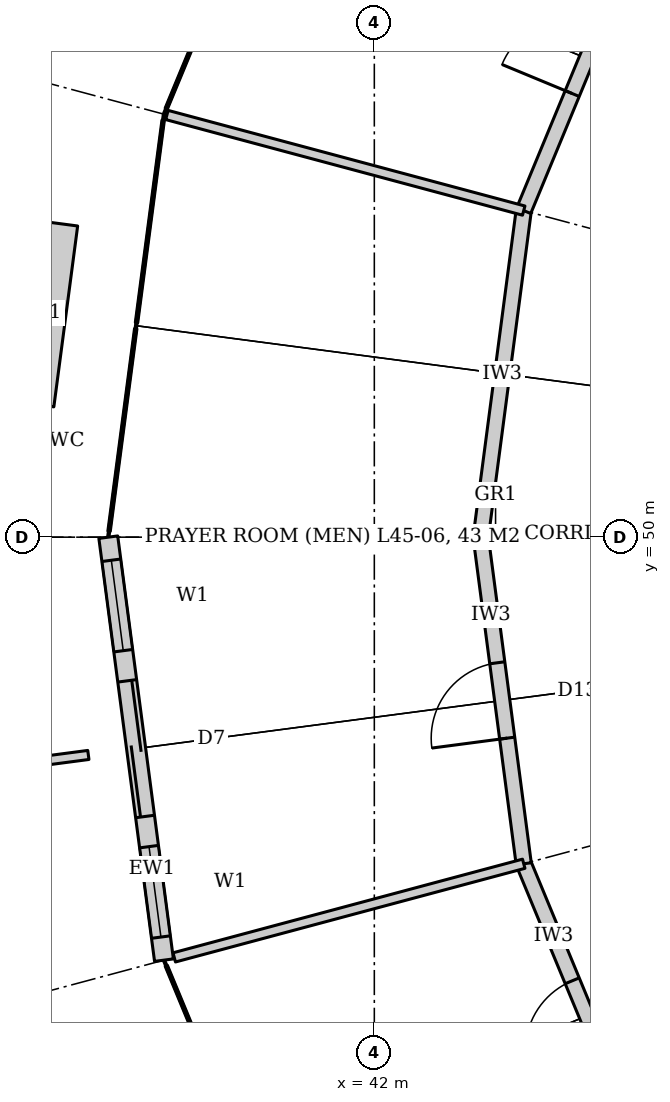
"""IFC4 building model, lengths in metres.
Left out: names, types, materials, properties, quantities, classifications, styles, units other than length and angle.
Written with IfcOpenShell. Run it as: python <this file> out.ifc"""

import sys

from ifc_helpers import new_model, si_unit, direction, frame, frame_2d, origin, place, context, subcontext, project, spatial, rectangle, extrude, element, fill, save


model = new_model("IFC4")
c1 = context("Model", 3, precision=1e-05, world=origin(), true_north=direction((0.0, 1.0)))
c2 = subcontext(c1, "Body", "Model", "MODEL_VIEW")
j1 = project(units=[si_unit("LENGTHUNIT", "METRE"), si_unit("PLANEANGLEUNIT", "RADIAN")], contexts=[c1])
p1 = place(None, origin())
s1 = spatial("IfcSite", under=j1, at=p1, CompositionType="ELEMENT")
p2 = place(p1, origin())
s2 = spatial("IfcBuilding", under=s1, at=p2, CompositionType="ELEMENT")
p3 = place(p2, frame((0.0, 0.0, 198.2)))
s3 = spatial("IfcBuildingStorey", under=s2, at=p3, CompositionType="ELEMENT", Elevation=198.2)
p4 = place(p3, frame((45.624, 41.7, 0.0), z_axis=(0.0, 0.0, 1.0), x_axis=(-0.382698425325, 0.923873322082, 0.0)))
e1 = element("IfcWall", 1, at=p4, inside=s3, PredefinedType="PARTITIONING", context=c2, shape_type="SweptSolid", body=[
    extrude(rectangle(XDim=4.333, YDim=0.2, at=frame_2d((2.167, 0.0))), origin(), (0.0, 0.0, 1.0), 3.012),
])
p5 = place(p4, frame((1.667, 0.0, 0.0)))
e2 = element("IfcOpeningElement", 2, at=p5, cuts=e1, PredefinedType="OPENING", context=c2, shape_type="SweptSolid", body=[
    extrude(rectangle(XDim=1.0, YDim=2.1, at=frame_2d((0.5, 1.05))), frame((0.0, 0.11, 0.0), z_axis=(0.0, -1.0, 0.0), x_axis=(1.0, 0.0, 0.0)), (0.0, 0.0, 1.0), 0.22),
])
p6 = place(p3, frame((43.966, 45.704, 0.0), z_axis=(0.0, 0.0, 1.0), x_axis=(-0.130536124221, 0.99144355375, 0.0)))
e3 = element("IfcWall", 3, at=p6, inside=s3, PredefinedType="PARTITIONING", context=c2, shape_type="SweptSolid", body=[
    extrude(rectangle(XDim=4.333, YDim=0.2, at=frame_2d((2.167, 0.0))), origin(), (0.0, 0.0, 1.0), 3.012),
])
p7 = place(p6, frame((1.667, 0.0, 0.0)))
e4 = element("IfcOpeningElement", 4, at=p7, cuts=e3, PredefinedType="OPENING", context=c2, shape_type="SweptSolid", body=[
    extrude(rectangle(XDim=1.0, YDim=2.4, at=frame_2d((0.5, 1.2))), frame((0.0, 0.11, 0.0), z_axis=(0.0, -1.0, 0.0), x_axis=(1.0, 0.0, 0.0)), (0.0, 0.0, 1.0), 0.22),
])
p8 = place(p3, frame((43.4, 50.0, 0.0), z_axis=(0.0, 0.0, 1.0), x_axis=(0.130536124221, 0.99144355375, 0.0)))
e5 = element("IfcWall", 5, at=p8, inside=s3, PredefinedType="PARTITIONING", context=c2, shape_type="SweptSolid", body=[
    extrude(rectangle(XDim=4.333, YDim=0.2, at=frame_2d((2.167, 0.0))), origin(), (0.0, 0.0, 1.0), 3.012),
])
p9 = place(p3, frame((43.966, 54.296, 0.0), z_axis=(0.0, 0.0, 1.0), x_axis=(0.382698425325, 0.923873322082, 0.0)))
e6 = element("IfcWall", 6, at=p9, inside=s3, PredefinedType="PARTITIONING", context=c2, shape_type="SweptSolid", body=[
    extrude(rectangle(XDim=4.333, YDim=0.2, at=frame_2d((2.167, 0.0))), origin(), (0.0, 0.0, 1.0), 3.012),
])
p10 = place(p9, frame((1.667, 0.0, 0.0)))
e7 = element("IfcOpeningElement", 7, at=p10, cuts=e6, PredefinedType="OPENING", context=c2, shape_type="SweptSolid", body=[
    extrude(rectangle(XDim=1.0, YDim=2.1, at=frame_2d((0.5, 1.05))), frame((0.0, 0.11, 0.0), z_axis=(0.0, -1.0, 0.0), x_axis=(1.0, 0.0, 0.0)), (0.0, 0.0, 1.0), 0.22),
])
p11 = place(p3, frame((53.8, 56.2, 0.0), z_axis=(0.0, 0.0, 1.0), x_axis=(-0.707106781187, 0.707106781187, 0.0)))
e8 = element("IfcWall", 8, at=p11, inside=s3, PredefinedType="PARTITIONING", context=c2, shape_type="SweptSolid", body=[
    extrude(rectangle(XDim=12.692, YDim=0.2, at=frame_2d((6.346, 0.0))), origin(), (0.0, 0.0, 1.0), 3.02),
])
p12 = place(p3, frame((43.966, 54.296, 0.0), z_axis=(0.0, 0.0, 1.0), x_axis=(-0.965927422152, 0.258813089189, 0.0)))
e9 = element("IfcWall", 9, at=p12, inside=s3, PredefinedType="PARTITIONING", context=c2, shape_type="SweptSolid", body=[
    extrude(rectangle(XDim=4.86, YDim=0.125, at=frame_2d((2.43, 0.0))), origin(), (0.0, 0.0, 1.0), 3.04),
])
p13 = place(p3, frame((43.966, 45.704, 0.0), z_axis=(0.0, 0.0, 1.0), x_axis=(-0.965926072385, -0.25881812666, 0.0)))
e10 = element("IfcWall", 10, at=p13, inside=s3, PredefinedType="PARTITIONING", context=c2, shape_type="SweptSolid", body=[
    extrude(rectangle(XDim=4.76, YDim=0.125, at=frame_2d((2.38, 0.0))), origin(), (0.0, 0.0, 1.0), 3.04),
])
p14 = place(p3, frame((53.8, 43.8, 0.0), z_axis=(0.0, 0.0, 1.0), x_axis=(-0.707106781187, -0.707106781187, 0.0)))
e11 = element("IfcWall", 11, at=p14, inside=s3, PredefinedType="PARTITIONING", context=c2, shape_type="SweptSolid", body=[
    extrude(rectangle(XDim=12.692, YDim=0.2, at=frame_2d((6.346, 0.0))), origin(), (0.0, 0.0, 1.0), 3.02),
])
p15 = place(p14, frame((2.716, 0.0, 0.0)))
e12 = element("IfcOpeningElement", 12, at=p15, cuts=e11, PredefinedType="OPENING", context=c2, shape_type="SweptSolid", body=[
    extrude(rectangle(XDim=2.4, YDim=2.4, at=frame_2d((1.2, 1.2))), frame((0.0, 0.11, 0.0), z_axis=(0.0, -1.0, 0.0), x_axis=(1.0, 0.0, 0.0)), (0.0, 0.0, 1.0), 0.22),
])
p16 = place(p3, frame((38.5, 50.0, 0.0), z_axis=(0.0, 0.0, 1.0), x_axis=(0.130536651449, -0.991443484334, 0.0)))
e13 = element("IfcWall", 13, at=p16, inside=s3, PredefinedType="SOLIDWALL", context=c2, shape_type="SweptSolid", body=[
    extrude(rectangle(XDim=5.613, YDim=0.25, at=frame_2d((2.806, 0.0))), origin(), (0.0, 0.0, 1.0), 4.04),
])
p17 = place(p16, frame((1.906, 0.0, 0.0)))
e14 = element("IfcOpeningElement", 14, at=p17, cuts=e13, PredefinedType="OPENING", context=c2, shape_type="SweptSolid", body=[
    extrude(rectangle(XDim=1.8, YDim=2.4, at=frame_2d((0.9, 1.2))), frame((0.0, 0.135, 0.0), z_axis=(0.0, -1.0, 0.0), x_axis=(1.0, 0.0, 0.0)), (0.0, 0.0, 1.0), 0.27),
])
p18 = place(p16, frame((0.306, 0.0, 0.0)))
e15 = element("IfcOpeningElement", 15, at=p18, cuts=e13, PredefinedType="OPENING", context=c2, shape_type="SweptSolid", body=[
    extrude(rectangle(XDim=1.2, YDim=2.4, at=frame_2d((0.6, 1.2))), frame((0.0, 0.135, 0.0), z_axis=(0.0, -1.0, 0.0), x_axis=(1.0, 0.0, 0.0)), (0.0, 0.0, 1.0), 0.27),
])
p19 = place(p16, frame((4.106, 0.0, 0.0)))
e16 = element("IfcOpeningElement", 16, at=p19, cuts=e13, PredefinedType="OPENING", context=c2, shape_type="SweptSolid", body=[
    extrude(rectangle(XDim=1.2, YDim=2.4, at=frame_2d((0.6, 1.2))), frame((0.0, 0.135, 0.0), z_axis=(0.0, -1.0, 0.0), x_axis=(1.0, 0.0, 0.0)), (0.0, 0.0, 1.0), 0.27),
])
p20 = place(p10, origin())
e17 = element("IfcDoor", 17, at=p20, inside=s3, OperationType="SINGLE_SWING_LEFT", PredefinedType="DOOR", context=c2, shape_type="SweptSolid", body=[
    extrude(rectangle(XDim=1.0, YDim=2.1, at=frame_2d((0.5, 1.05))), frame((0.0, 0.025, 0.0), z_axis=(0.0, -1.0, 0.0), x_axis=(1.0, 0.0, 0.0)), (0.0, 0.0, 1.0), 0.05),
])
fill(e7, e17)
p21 = place(p7, origin())
e18 = element("IfcDoor", 18, at=p21, inside=s3, OperationType="SINGLE_SWING_LEFT", PredefinedType="DOOR", context=c2, shape_type="SweptSolid", body=[
    extrude(rectangle(XDim=1.0, YDim=2.4, at=frame_2d((0.5, 1.2))), frame((0.0, 0.025, 0.0), z_axis=(0.0, -1.0, 0.0), x_axis=(1.0, 0.0, 0.0)), (0.0, 0.0, 1.0), 0.05),
])
fill(e4, e18)
p22 = place(p5, origin())
e19 = element("IfcDoor", 19, at=p22, inside=s3, OperationType="SINGLE_SWING_LEFT", PredefinedType="DOOR", context=c2, shape_type="SweptSolid", body=[
    extrude(rectangle(XDim=1.0, YDim=2.1, at=frame_2d((0.5, 1.05))), frame((0.0, 0.025, 0.0), z_axis=(0.0, -1.0, 0.0), x_axis=(1.0, 0.0, 0.0)), (0.0, 0.0, 1.0), 0.05),
])
fill(e2, e19)
p23 = place(p17, origin())
e20 = element("IfcDoor", 20, at=p23, inside=s3, OperationType="DOUBLE_DOOR_SLIDING", PredefinedType="DOOR", context=c2, shape_type="SweptSolid", body=[
    extrude(rectangle(XDim=1.8, YDim=2.4, at=frame_2d((0.9, 1.2))), frame((0.0, 0.025, 0.0), z_axis=(0.0, -1.0, 0.0), x_axis=(1.0, 0.0, 0.0)), (0.0, 0.0, 1.0), 0.05),
])
fill(e14, e20)
p24 = place(p18, origin())
e21 = element("IfcWindow", 21, at=p24, inside=s3, PartitioningType="SINGLE_PANEL", PredefinedType="WINDOW", context=c2, shape_type="SweptSolid", body=[
    extrude(rectangle(XDim=1.2, YDim=2.4, at=frame_2d((0.6, 1.2))), frame((0.0, 0.03, 0.0), z_axis=(0.0, -1.0, 0.0), x_axis=(1.0, 0.0, 0.0)), (0.0, 0.0, 1.0), 0.06),
])
fill(e15, e21)
p25 = place(p19, origin())
e22 = element("IfcWindow", 22, at=p25, inside=s3, PartitioningType="SINGLE_PANEL", PredefinedType="WINDOW", context=c2, shape_type="SweptSolid", body=[
    extrude(rectangle(XDim=1.2, YDim=2.4, at=frame_2d((0.6, 1.2))), frame((0.0, 0.03, 0.0), z_axis=(0.0, -1.0, 0.0), x_axis=(1.0, 0.0, 0.0)), (0.0, 0.0, 1.0), 0.06),
])
fill(e16, e22)
save(model, sys.argv[1])
